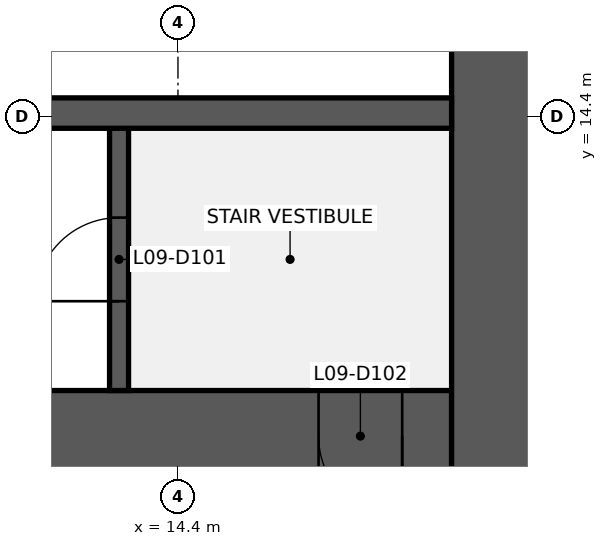
"""IFC4 building model, lengths in metres.
Left out: names, types, materials, properties, quantities, classifications, styles, units other than length and angle.
Written with IfcOpenShell. Run it as: python <this file> out.ifc"""

import sys

from ifc_helpers import new_model, si_unit, direction, frame, frame_2d, origin, place, context, subcontext, project, spatial, rectangle, extrude, element, fill, save


model = new_model("IFC4")
c1 = context("Model", 3, precision=1e-05, world=origin(), true_north=direction((0.0, 1.0)))
c2 = subcontext(c1, "Body", "Model", "MODEL_VIEW")
j1 = project(units=[si_unit("LENGTHUNIT", "METRE"), si_unit("PLANEANGLEUNIT", "RADIAN")], contexts=[c1])
p1 = place(None, origin())
s1 = spatial("IfcSite", under=j1, at=p1, CompositionType="ELEMENT")
p2 = place(p1, origin())
s2 = spatial("IfcBuilding", under=s1, at=p2, CompositionType="ELEMENT")
p3 = place(p2, frame((0.0, 0.0, 47.0)))
s3 = spatial("IfcBuildingStorey", under=s2, at=p3, CompositionType="ELEMENT", Elevation=47.0)
p4 = place(p3, frame((18.0, 10.2, 0.0), z_axis=(0.0, 0.0, 1.0), x_axis=(-1.0, 0.0, 0.0)))
e1 = element("IfcWall", 1, at=p4, inside=s3, PredefinedType="SHEAR", context=c2, shape_type="SweptSolid", body=[
    extrude(rectangle(XDim=13.2, YDim=1.2, at=frame_2d((6.6, 0.0))), origin(), (0.0, 0.0, 1.0), 3.84),
])
p5 = place(p4, frame((0.65, 0.0, 0.0)))
e2 = element("IfcOpeningElement", 2, at=p5, cuts=e1, PredefinedType="OPENING", context=c2, shape_type="SweptSolid", body=[
    extrude(rectangle(XDim=1.1, YDim=2.1, at=frame_2d((0.55, 1.05))), frame((0.0, 0.61, 0.0), z_axis=(0.0, -1.0, 0.0), x_axis=(1.0, 0.0, 0.0)), (0.0, 0.0, 1.0), 1.22),
])
p6 = place(p3, frame((18.6, 38.4, 0.0), z_axis=(0.0, 0.0, 1.0), x_axis=(0.0, -1.0, 0.0)))
e3 = element("IfcWall", 3, at=p6, inside=s3, PredefinedType="SHEAR", context=c2, shape_type="SweptSolid", body=[
    extrude(rectangle(XDim=28.8, YDim=1.2, at=frame_2d((14.4, 0.0))), origin(), (0.0, 0.0, 1.0), 3.84),
])
p7 = place(p6, frame((18.3, 0.0, 0.0)))
e4 = element("IfcOpeningElement", 4, at=p7, cuts=e3, PredefinedType="OPENING", context=c2, shape_type="SweptSolid", body=[
    extrude(rectangle(XDim=1.8, YDim=2.1, at=frame_2d((0.9, 1.05))), frame((0.0, 0.61, 0.0), z_axis=(0.0, -1.0, 0.0), x_axis=(1.0, 0.0, 0.0)), (0.0, 0.0, 1.0), 1.22),
])
p8 = place(p6, frame((8.7, 0.0, 0.0)))
e5 = element("IfcOpeningElement", 5, at=p8, cuts=e3, PredefinedType="OPENING", context=c2, shape_type="SweptSolid", body=[
    extrude(rectangle(XDim=1.8, YDim=2.1, at=frame_2d((0.9, 1.05))), frame((0.0, 0.61, 0.0), z_axis=(0.0, -1.0, 0.0), x_axis=(1.0, 0.0, 0.0)), (0.0, 0.0, 1.0), 1.22),
])
p9 = place(p3, frame((13.625, 10.8, 0.0), z_axis=(0.0, 0.0, 1.0), x_axis=(0.0, 1.0, 0.0)))
e6 = element("IfcWall", 6, at=p9, inside=s3, PredefinedType="SHEAR", context=c2, shape_type="SweptSolid", body=[
    extrude(rectangle(XDim=3.45, YDim=0.25, at=frame_2d((1.725, 0.0))), origin(), (0.0, 0.0, 1.0), 3.84),
])
p10 = place(p9, frame((1.175, 0.0, 0.0)))
e7 = element("IfcOpeningElement", 7, at=p10, cuts=e6, PredefinedType="OPENING", context=c2, shape_type="SweptSolid", body=[
    extrude(rectangle(XDim=1.1, YDim=2.1, at=frame_2d((0.55, 1.05))), frame((0.0, 0.135, 0.0), z_axis=(0.0, -1.0, 0.0), x_axis=(1.0, 0.0, 0.0)), (0.0, 0.0, 1.0), 0.27),
])
p11 = place(p3, frame((1.2, 14.45, 0.0), z_axis=(0.0, 0.0, 1.0), x_axis=(1.0, 0.0, 0.0)))
e8 = element("IfcWall", 8, at=p11, inside=s3, PredefinedType="SHEAR", context=c2, shape_type="SweptSolid", body=[
    extrude(rectangle(XDim=16.8, YDim=0.4, at=frame_2d((8.4, 0.0))), origin(), (0.0, 0.0, 1.0), 3.84),
])
p12 = place(p10, origin())
e9 = element("IfcDoor", 9, at=p12, inside=s3, OperationType="SINGLE_SWING_LEFT", PredefinedType="DOOR", context=c2, shape_type="SweptSolid", body=[
    extrude(rectangle(XDim=1.1, YDim=2.1, at=frame_2d((0.55, 1.05))), frame((0.0, 0.025, 0.0), z_axis=(0.0, -1.0, 0.0), x_axis=(1.0, 0.0, 0.0)), (0.0, 0.0, 1.0), 0.05),
])
fill(e7, e9)
p13 = place(p5, origin())
e10 = element("IfcDoor", 10, at=p13, inside=s3, OperationType="SINGLE_SWING_LEFT", PredefinedType="DOOR", context=c2, shape_type="SweptSolid", body=[
    extrude(rectangle(XDim=1.1, YDim=2.1, at=frame_2d((0.55, 1.05))), frame((0.0, 0.025, 0.0), z_axis=(0.0, -1.0, 0.0), x_axis=(1.0, 0.0, 0.0)), (0.0, 0.0, 1.0), 0.05),
])
fill(e2, e10)
save(model, sys.argv[1])
